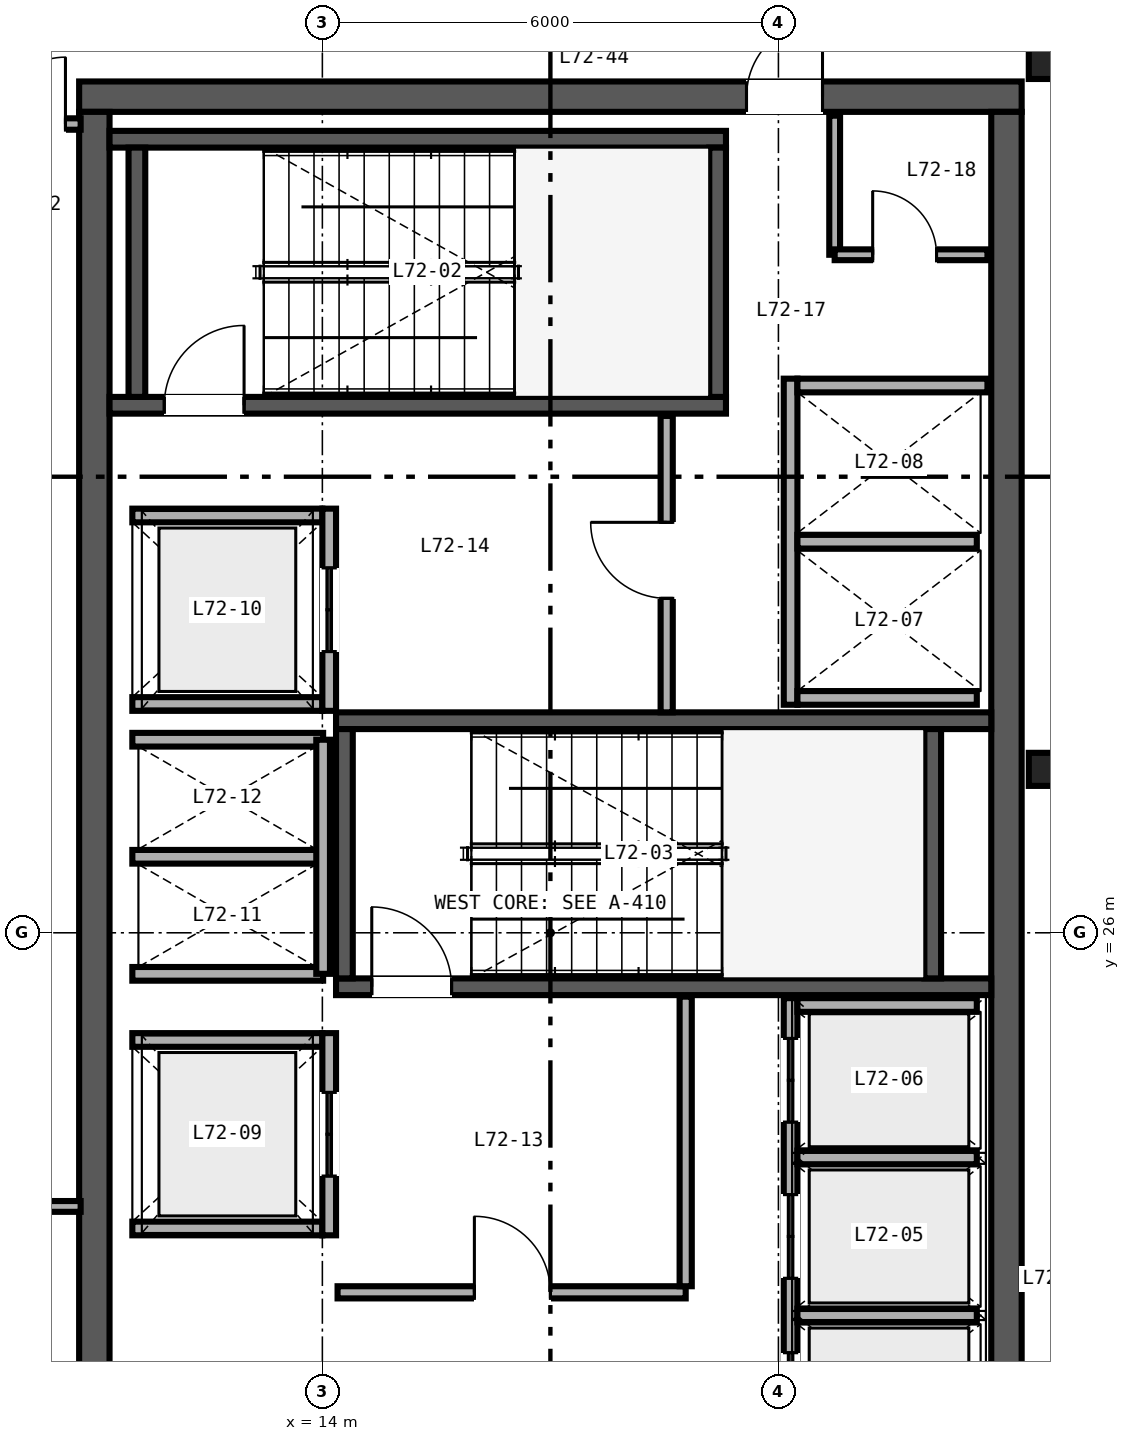
"""IFC4 building model, lengths in metres.
Left out: names, types, materials, properties, quantities, classifications, styles, units other than length and angle.
Written with IfcOpenShell. Run it as: python <this file> out.ifc"""

import sys

from ifc_helpers import new_model, si_unit, direction, frame, frame_2d, origin, origin_2d, place, context, subcontext, project, spatial, rectangle, i_section, extrude, source, transform, mapped, element, fill, save


model = new_model("IFC4")
c1 = context("Model", 3, precision=1e-05, world=origin(), true_north=direction((0.0, 1.0)))
c2 = subcontext(c1, "Body", "Model", "MODEL_VIEW")
j1 = project(units=[si_unit("LENGTHUNIT", "METRE"), si_unit("PLANEANGLEUNIT", "RADIAN")], contexts=[c1])
p1 = place(None, origin())
s1 = spatial("IfcSite", under=j1, at=p1, CompositionType="ELEMENT")
p2 = place(p1, origin())
s2 = spatial("IfcBuilding", under=s1, at=p2, CompositionType="ELEMENT")
p3 = place(p2, frame((0.0, 0.0, 283.2)))
s3 = spatial("IfcBuildingStorey", under=s2, at=p3, CompositionType="ELEMENT", Elevation=283.2)
p4 = place(p3, frame((10.8, 37.0, 0.0), z_axis=(0.0, 0.0, 1.0), x_axis=(1.0, 0.0, 0.0)))
e1 = element("IfcWall", 1, at=p4, inside=s3, PredefinedType="SHEAR", context=c2, shape_type="SweptSolid", body=[
    extrude(rectangle(XDim=12.4, YDim=0.4, at=frame_2d((6.2, 0.0))), origin(), (0.0, 0.0, 1.0), 3.38),
])
p5 = place(p4, frame((8.78, 0.0, 0.0)))
e2 = element("IfcOpeningElement", 2, at=p5, cuts=e1, PredefinedType="OPENING", context=c2, shape_type="SweptSolid", body=[
    extrude(rectangle(XDim=1.0, YDim=2.15, at=frame_2d((0.5, 1.075))), frame((0.0, 0.21, 0.0), z_axis=(0.0, -1.0, 0.0), x_axis=(1.0, 0.0, 0.0)), (0.0, 0.0, 1.0), 0.42),
])
for number, where, z_axis, x_axis in (
    (3, (11.0, 15.2, 0.0), (0.0, 0.0, 1.0), (0.0, 1.0, 0.0)),
    (4, (23.0, 15.2, 0.0), (0.0, 0.0, 1.0), (0.0, 1.0, 0.0)),
):
    element("IfcWall", number, at=place(p3, frame(where, z_axis=z_axis, x_axis=x_axis)), inside=s3, PredefinedType="SHEAR", context=c2, shape_type="SweptSolid", body=[
        extrude(rectangle(XDim=21.6, YDim=0.4, at=frame_2d((10.8, 0.0))), origin(), (0.0, 0.0, 1.0), 3.38),
    ])
p6 = place(p3, frame((11.2, 32.94, 0.0), z_axis=(0.0, 0.0, 1.0), x_axis=(1.0, 0.0, 0.0)))
e5 = element("IfcWall", 5, at=p6, inside=s3, PredefinedType="SHEAR", context=c2, shape_type="SweptSolid", body=[
    extrude(rectangle(XDim=8.11, YDim=0.22, at=frame_2d((4.055, 0.0))), origin(), (0.0, 0.0, 1.0), 3.4),
])
p7 = place(p6, frame((0.72, 0.0, 0.0)))
e6 = element("IfcOpeningElement", 6, at=p7, cuts=e5, PredefinedType="OPENING", context=c2, shape_type="SweptSolid", body=[
    extrude(rectangle(XDim=1.05, YDim=2.15, at=frame_2d((0.525, 1.075))), frame((0.0, 0.12, 0.0), z_axis=(0.0, -1.0, 0.0), x_axis=(1.0, 0.0, 0.0)), (0.0, 0.0, 1.0), 0.24),
])
p8 = place(p3, frame((11.2, 36.44, 0.0), z_axis=(0.0, 0.0, 1.0), x_axis=(1.0, 0.0, 0.0)))
e7 = element("IfcWall", 7, at=p8, inside=s3, PredefinedType="SHEAR", context=c2, shape_type="SweptSolid", body=[
    extrude(rectangle(XDim=8.11, YDim=0.22, at=frame_2d((4.055, 0.0))), origin(), (0.0, 0.0, 1.0), 3.4),
])
for number, where, z_axis, x_axis in (
    (8, (11.56, 33.05, 0.0), (0.0, 0.0, 1.0), (0.0, 1.0, 0.0)),
    (9, (19.2, 33.05, 0.0), (0.0, 0.0, 1.0), (0.0, 1.0, 0.0)),
):
    element("IfcWall", number, at=place(p3, frame(where, z_axis=z_axis, x_axis=x_axis)), inside=s3, PredefinedType="SHEAR", context=c2, shape_type="SweptSolid", body=[
        extrude(rectangle(XDim=3.28, YDim=0.22, at=frame_2d((1.64, 0.0))), origin(), (0.0, 0.0, 1.0), 3.4),
    ])
p9 = place(p3, frame((14.18, 25.29, 0.0), z_axis=(0.0, 0.0, 1.0), x_axis=(1.0, 0.0, 0.0)))
e10 = element("IfcWall", 10, at=p9, inside=s3, PredefinedType="SHEAR", context=c2, shape_type="SweptSolid", body=[
    extrude(rectangle(XDim=8.62, YDim=0.22, at=frame_2d((4.31, 0.0))), origin(), (0.0, 0.0, 1.0), 3.4),
])
p10 = place(p9, frame((0.47, 0.0, 0.0)))
e11 = element("IfcOpeningElement", 11, at=p10, cuts=e10, PredefinedType="OPENING", context=c2, shape_type="SweptSolid", body=[
    extrude(rectangle(XDim=1.05, YDim=2.15, at=frame_2d((0.525, 1.075))), frame((0.0, 0.12, 0.0), z_axis=(0.0, -1.0, 0.0), x_axis=(1.0, 0.0, 0.0)), (0.0, 0.0, 1.0), 0.24),
])
p11 = place(p3, frame((14.18, 28.79, 0.0), z_axis=(0.0, 0.0, 1.0), x_axis=(1.0, 0.0, 0.0)))
e12 = element("IfcWall", 12, at=p11, inside=s3, PredefinedType="SHEAR", context=c2, shape_type="SweptSolid", body=[
    extrude(rectangle(XDim=8.62, YDim=0.22, at=frame_2d((4.31, 0.0))), origin(), (0.0, 0.0, 1.0), 3.4),
])
for number, where, z_axis, x_axis in (
    (13, (14.29, 25.4, 0.0), (0.0, 0.0, 1.0), (0.0, 1.0, 0.0)),
    (14, (22.03, 25.4, 0.0), (0.0, 0.0, 1.0), (0.0, 1.0, 0.0)),
):
    element("IfcWall", number, at=place(p3, frame(where, z_axis=z_axis, x_axis=x_axis)), inside=s3, PredefinedType="SHEAR", context=c2, shape_type="SweptSolid", body=[
        extrude(rectangle(XDim=3.28, YDim=0.22, at=frame_2d((1.64, 0.0))), origin(), (0.0, 0.0, 1.0), 3.4),
    ])
m1 = source(origin(), c2, "Body", "SweptSolid", [
    extrude(i_section(OverallWidth=0.412, OverallDepth=0.435, WebThickness=0.036, FlangeThickness=0.057, FilletRadius=0.025, at=origin_2d()), origin(), (0.0, 0.0, 1.0), 3.38),
])
for number, where, z_axis, x_axis in (
    (15, (23.5, 28.15, 0.0), (0.0, 0.0, 1.0), (1.0, 0.0, 0.0)),
    (16, (23.5, 37.45, 0.0), (0.0, 0.0, 1.0), (1.0, 0.0, 0.0)),
):
    element("IfcColumn", number, at=place(p3, frame(where, z_axis=z_axis, x_axis=x_axis)), inside=s3, PredefinedType="COLUMN", context=c2, shape_type="MappedRepresentation", body=[
        mapped(m1, transform((0.0, 0.0, 0.0), scale=1.0)),
    ])
p12 = place(p3, frame((20.16, 18.82, 0.0), z_axis=(0.0, 0.0, 1.0), x_axis=(0.0, 1.0, 0.0)))
e17 = element("IfcWall", 17, at=p12, inside=s3, PredefinedType="SOLIDWALL", context=c2, shape_type="SweptSolid", body=[
    extrude(rectangle(XDim=6.32, YDim=0.18, at=frame_2d((3.16, 0.0))), origin(), (0.0, 0.0, 1.0), 2.48),
])
p13 = place(p12, frame((0.555, 0.0, 0.0)))
e18 = element("IfcOpeningElement", 18, at=p13, cuts=e17, PredefinedType="OPENING", context=c2, shape_type="SweptSolid", body=[
    extrude(rectangle(XDim=1.1, YDim=2.2, at=frame_2d((0.55, 1.1))), frame((0.0, 0.1, 0.0), z_axis=(0.0, -1.0, 0.0), x_axis=(1.0, 0.0, 0.0)), (0.0, 0.0, 1.0), 0.2),
])
p14 = place(p12, frame((2.635, 0.0, 0.0)))
e19 = element("IfcOpeningElement", 19, at=p14, cuts=e17, PredefinedType="OPENING", context=c2, shape_type="SweptSolid", body=[
    extrude(rectangle(XDim=1.1, YDim=2.2, at=frame_2d((0.55, 1.1))), frame((0.0, 0.1, 0.0), z_axis=(0.0, -1.0, 0.0), x_axis=(1.0, 0.0, 0.0)), (0.0, 0.0, 1.0), 0.2),
])
p15 = place(p12, frame((4.69, 0.0, 0.0)))
e20 = element("IfcOpeningElement", 20, at=p15, cuts=e17, PredefinedType="OPENING", context=c2, shape_type="SweptSolid", body=[
    extrude(rectangle(XDim=1.1, YDim=2.2, at=frame_2d((0.55, 1.1))), frame((0.0, 0.1, 0.0), z_axis=(0.0, -1.0, 0.0), x_axis=(1.0, 0.0, 0.0)), (0.0, 0.0, 1.0), 0.2),
])
p16 = place(p3, frame((20.25, 25.05, 0.0), z_axis=(0.0, 0.0, 1.0), x_axis=(1.0, 0.0, 0.0)))
e21 = element("IfcWall", 21, at=p16, inside=s3, PredefinedType="SOLIDWALL", context=c2, shape_type="SweptSolid", body=[
    extrude(rectangle(XDim=2.36, YDim=0.18, at=frame_2d((1.18, 0.0))), origin(), (0.0, 0.0, 1.0), 3.38),
])
p17 = place(p3, frame((20.25, 20.965, 0.0), z_axis=(0.0, 0.0, 1.0), x_axis=(1.0, 0.0, 0.0)))
e22 = element("IfcWall", 22, at=p17, inside=s3, PredefinedType="SOLIDWALL", context=c2, shape_type="SweptSolid", body=[
    extrude(rectangle(XDim=2.36, YDim=0.18, at=frame_2d((1.18, 0.0))), origin(), (0.0, 0.0, 1.0), 2.48),
])
p18 = place(p3, frame((20.25, 23.045, 0.0), z_axis=(0.0, 0.0, 1.0), x_axis=(1.0, 0.0, 0.0)))
e23 = element("IfcWall", 23, at=p18, inside=s3, PredefinedType="SOLIDWALL", context=c2, shape_type="SweptSolid", body=[
    extrude(rectangle(XDim=2.36, YDim=0.18, at=frame_2d((1.18, 0.0))), origin(), (0.0, 0.0, 1.0), 3.38),
])
p19 = place(p3, frame((20.16, 29.0, 0.0), z_axis=(0.0, 0.0, 1.0), x_axis=(0.0, 1.0, 0.0)))
e24 = element("IfcWall", 24, at=p19, inside=s3, PredefinedType="SOLIDWALL", context=c2, shape_type="SweptSolid", body=[
    extrude(rectangle(XDim=4.29, YDim=0.18, at=frame_2d((2.145, 0.0))), origin(), (0.0, 0.0, 1.0), 3.38),
])
p20 = place(p3, frame((20.25, 29.09, 0.0), z_axis=(0.0, 0.0, 1.0), x_axis=(1.0, 0.0, 0.0)))
e25 = element("IfcWall", 25, at=p20, inside=s3, PredefinedType="SOLIDWALL", context=c2, shape_type="SweptSolid", body=[
    extrude(rectangle(XDim=2.36, YDim=0.18, at=frame_2d((1.18, 0.0))), origin(), (0.0, 0.0, 1.0), 3.38),
])
p21 = place(p3, frame((20.25, 33.2, 0.0), z_axis=(0.0, 0.0, 1.0), x_axis=(1.0, 0.0, 0.0)))
e26 = element("IfcWall", 26, at=p21, inside=s3, PredefinedType="SOLIDWALL", context=c2, shape_type="SweptSolid", body=[
    extrude(rectangle(XDim=2.5, YDim=0.18, at=frame_2d((1.25, 0.0))), origin(), (0.0, 0.0, 1.0), 3.38),
])
p22 = place(p3, frame((20.25, 31.145, 0.0), z_axis=(0.0, 0.0, 1.0), x_axis=(1.0, 0.0, 0.0)))
e27 = element("IfcWall", 27, at=p22, inside=s3, PredefinedType="SOLIDWALL", context=c2, shape_type="SweptSolid", body=[
    extrude(rectangle(XDim=2.36, YDim=0.18, at=frame_2d((1.18, 0.0))), origin(), (0.0, 0.0, 1.0), 3.38),
])
for number, where, z_axis, x_axis in (
    (28, (11.5, 22.11, 0.0), (0.0, 0.0, 1.0), (1.0, 0.0, 0.0)),
    (29, (11.5, 24.59, 0.0), (0.0, 0.0, 1.0), (1.0, 0.0, 0.0)),
):
    element("IfcWall", number, at=place(p3, frame(where, z_axis=z_axis, x_axis=x_axis)), inside=s3, PredefinedType="SOLIDWALL", context=c2, shape_type="SweptSolid", body=[
        extrude(rectangle(XDim=2.5, YDim=0.18, at=frame_2d((1.25, 0.0))), origin(), (0.0, 0.0, 1.0), 3.38),
    ])
p23 = place(p3, frame((14.09, 22.02, 0.0), z_axis=(0.0, 0.0, 1.0), x_axis=(0.0, 1.0, 0.0)))
e30 = element("IfcWall", 30, at=p23, inside=s3, PredefinedType="SOLIDWALL", context=c2, shape_type="SweptSolid", body=[
    extrude(rectangle(XDim=2.66, YDim=0.18, at=frame_2d((1.33, 0.0))), origin(), (0.0, 0.0, 1.0), 3.38),
])
p24 = place(p23, frame((0.78, 0.0, 0.0)))
e31 = element("IfcOpeningElement", 31, at=p24, cuts=e30, PredefinedType="OPENING", context=c2, shape_type="SweptSolid", body=[
    extrude(rectangle(XDim=1.1, YDim=2.2, at=frame_2d((0.55, 1.1))), frame((0.0, 0.1, 0.0), z_axis=(0.0, -1.0, 0.0), x_axis=(1.0, 0.0, 0.0)), (0.0, 0.0, 1.0), 0.2),
])
for number, where, z_axis, x_axis in (
    (32, (11.5, 29.01, 0.0), (0.0, 0.0, 1.0), (1.0, 0.0, 0.0)),
    (33, (11.5, 31.49, 0.0), (0.0, 0.0, 1.0), (1.0, 0.0, 0.0)),
):
    element("IfcWall", number, at=place(p3, frame(where, z_axis=z_axis, x_axis=x_axis)), inside=s3, PredefinedType="SOLIDWALL", context=c2, shape_type="SweptSolid", body=[
        extrude(rectangle(XDim=2.5, YDim=0.18, at=frame_2d((1.25, 0.0))), origin(), (0.0, 0.0, 1.0), 3.38),
    ])
p25 = place(p3, frame((14.09, 28.92, 0.0), z_axis=(0.0, 0.0, 1.0), x_axis=(0.0, 1.0, 0.0)))
e34 = element("IfcWall", 34, at=p25, inside=s3, PredefinedType="SOLIDWALL", context=c2, shape_type="SweptSolid", body=[
    extrude(rectangle(XDim=2.66, YDim=0.18, at=frame_2d((1.33, 0.0))), origin(), (0.0, 0.0, 1.0), 3.38),
])
p26 = place(p25, frame((0.78, 0.0, 0.0)))
e35 = element("IfcOpeningElement", 35, at=p26, cuts=e34, PredefinedType="OPENING", context=c2, shape_type="SweptSolid", body=[
    extrude(rectangle(XDim=1.1, YDim=2.2, at=frame_2d((0.55, 1.1))), frame((0.0, 0.1, 0.0), z_axis=(0.0, -1.0, 0.0), x_axis=(1.0, 0.0, 0.0)), (0.0, 0.0, 1.0), 0.2),
])
for number, where, z_axis, x_axis in (
    (36, (11.5, 25.46, 0.0), (0.0, 0.0, 1.0), (1.0, 0.0, 0.0)),
    (37, (11.5, 27.0, 0.0), (0.0, 0.0, 1.0), (1.0, 0.0, 0.0)),
    (38, (11.5, 28.54, 0.0), (0.0, 0.0, 1.0), (1.0, 0.0, 0.0)),
):
    element("IfcWall", number, at=place(p3, frame(where, z_axis=z_axis, x_axis=x_axis)), inside=s3, PredefinedType="SOLIDWALL", context=c2, shape_type="SweptSolid", body=[
        extrude(rectangle(XDim=2.51, YDim=0.18, at=frame_2d((1.255, 0.0))), origin(), (0.0, 0.0, 1.0), 3.38),
    ])
p27 = place(p3, frame((14.01, 25.46, 0.0), z_axis=(0.0, 0.0, 1.0), x_axis=(0.0, 1.0, 0.0)))
e39 = element("IfcWall", 39, at=p27, inside=s3, PredefinedType="SOLIDWALL", context=c2, shape_type="SweptSolid", body=[
    extrude(rectangle(XDim=3.08, YDim=0.18, at=frame_2d((1.54, 0.0))), origin(), (0.0, 0.0, 1.0), 3.38),
])
p28 = place(p3, frame((14.2, 21.27, 0.0), z_axis=(0.0, 0.0, 1.0), x_axis=(1.0, 0.0, 0.0)))
e40 = element("IfcWall", 40, at=p28, inside=s3, PredefinedType="PARTITIONING", context=c2, shape_type="SweptSolid", body=[
    extrude(rectangle(XDim=4.58, YDim=0.16, at=frame_2d((2.29, 0.0))), origin(), (0.0, 0.0, 1.0), 3.38),
])
p29 = place(p28, frame((1.8, 0.0, 0.0)))
e41 = element("IfcOpeningElement", 41, at=p29, cuts=e40, PredefinedType="OPENING", context=c2, shape_type="SweptSolid", body=[
    extrude(rectangle(XDim=1.0, YDim=2.15, at=frame_2d((0.5, 1.075))), frame((0.0, 0.09, 0.0), z_axis=(0.0, -1.0, 0.0), x_axis=(1.0, 0.0, 0.0)), (0.0, 0.0, 1.0), 0.18),
])
p30 = place(p3, frame((18.78, 21.35, 0.0), z_axis=(0.0, 0.0, 1.0), x_axis=(0.0, 1.0, 0.0)))
e42 = element("IfcWall", 42, at=p30, inside=s3, PredefinedType="PARTITIONING", context=c2, shape_type="SweptSolid", body=[
    extrude(rectangle(XDim=3.81, YDim=0.16, at=frame_2d((1.905, 0.0))), origin(), (0.0, 0.0, 1.0), 3.38),
])
p31 = place(p3, frame((18.53, 28.9, 0.0), z_axis=(0.0, 0.0, 1.0), x_axis=(0.0, 1.0, 0.0)))
e43 = element("IfcWall", 43, at=p31, inside=s3, PredefinedType="PARTITIONING", context=c2, shape_type="SweptSolid", body=[
    extrude(rectangle(XDim=3.9, YDim=0.16, at=frame_2d((1.95, 0.0))), origin(), (0.0, 0.0, 1.0), 3.38),
])
p32 = place(p31, frame((1.5, 0.0, 0.0)))
e44 = element("IfcOpeningElement", 44, at=p32, cuts=e43, PredefinedType="OPENING", context=c2, shape_type="SweptSolid", body=[
    extrude(rectangle(XDim=1.0, YDim=2.15, at=frame_2d((0.5, 1.075))), frame((0.0, 0.09, 0.0), z_axis=(0.0, -1.0, 0.0), x_axis=(1.0, 0.0, 0.0)), (0.0, 0.0, 1.0), 0.18),
])
p33 = place(p3, frame((20.74, 34.92, 0.0), z_axis=(0.0, 0.0, 1.0), x_axis=(0.0, 1.0, 0.0)))
e45 = element("IfcWall", 45, at=p33, inside=s3, PredefinedType="PARTITIONING", context=c2, shape_type="SweptSolid", body=[
    extrude(rectangle(XDim=1.83, YDim=0.142, at=frame_2d((0.915, 0.0))), origin(), (0.0, 0.0, 1.0), 3.38),
])
p34 = place(p3, frame((20.74, 34.92, 0.0), z_axis=(0.0, 0.0, 1.0), x_axis=(1.0, 0.0, 0.0)))
e46 = element("IfcWall", 46, at=p34, inside=s3, PredefinedType="PARTITIONING", context=c2, shape_type="SweptSolid", body=[
    extrude(rectangle(XDim=2.01, YDim=0.142, at=frame_2d((1.005, 0.0))), origin(), (0.0, 0.0, 1.0), 3.38),
])
p35 = place(p34, frame((0.5, 0.0, 0.0)))
e47 = element("IfcOpeningElement", 47, at=p35, cuts=e46, PredefinedType="OPENING", context=c2, shape_type="SweptSolid", body=[
    extrude(rectangle(XDim=0.84, YDim=2.1, at=frame_2d((0.42, 1.05))), frame((0.0, 0.081, 0.0), z_axis=(0.0, -1.0, 0.0), x_axis=(1.0, 0.0, 0.0)), (0.0, 0.0, 1.0), 0.162),
])
p36 = place(p3, frame((8.16, 36.64, 0.0), z_axis=(0.0, 0.0, 1.0), x_axis=(1.0, 0.0, 0.0)))
e48 = element("IfcWall", 48, at=p36, inside=s3, PredefinedType="PARTITIONING", context=c2, shape_type="SweptSolid", body=[
    extrude(rectangle(XDim=2.66, YDim=0.15, at=frame_2d((1.33, 0.0))), origin(), (0.0, 0.0, 1.0), 2.763),
])
p37 = place(p36, frame((1.58, 0.0, 0.0)))
e49 = element("IfcOpeningElement", 49, at=p37, cuts=e48, PredefinedType="OPENING", context=c2, shape_type="SweptSolid", body=[
    extrude(rectangle(XDim=0.88, YDim=2.15, at=frame_2d((0.44, 1.075))), frame((0.0, 0.085, 0.0), z_axis=(0.0, -1.0, 0.0), x_axis=(1.0, 0.0, 0.0)), (0.0, 0.0, 1.0), 0.17),
])
p38 = place(p3, frame((8.16, 22.4, 0.0), z_axis=(0.0, 0.0, 1.0), x_axis=(1.0, 0.0, 0.0)))
e50 = element("IfcWall", 50, at=p38, inside=s3, PredefinedType="PARTITIONING", context=c2, shape_type="SweptSolid", body=[
    extrude(rectangle(XDim=2.66, YDim=0.142, at=frame_2d((1.33, 0.0))), origin(), (0.0, 0.0, 1.0), 2.601),
])
m2 = source(origin(), c2, "Body", "SweptSolid", [
    extrude(rectangle(XDim=1.05, YDim=2.15, at=frame_2d((0.525, 1.075))), frame((0.0, 0.025, 0.0), z_axis=(0.0, -1.0, 0.0), x_axis=(1.0, 0.0, 0.0)), (0.0, 0.0, 1.0), 0.05),
])
p39 = place(p7, origin())
e51 = element("IfcDoor", 51, at=p39, inside=s3, OperationType="SINGLE_SWING_RIGHT", PredefinedType="DOOR", context=c2, shape_type="MappedRepresentation", body=[
    mapped(m2, transform((0.0, 0.0, 0.0), scale=1.0)),
])
fill(e6, e51)
p40 = place(p10, origin())
e52 = element("IfcDoor", 52, at=p40, inside=s3, OperationType="SINGLE_SWING_LEFT", PredefinedType="DOOR", context=c2, shape_type="MappedRepresentation", body=[
    mapped(m2, transform((0.0, 0.0, 0.0), scale=1.0)),
])
fill(e11, e52)
m3 = source(origin(), c2, "Body", "SweptSolid", [
    extrude(rectangle(XDim=1.1, YDim=2.2, at=frame_2d((0.55, 1.1))), frame((0.0, 0.025, 0.0), z_axis=(0.0, -1.0, 0.0), x_axis=(1.0, 0.0, 0.0)), (0.0, 0.0, 1.0), 0.05),
])
p41 = place(p13, origin())
e53 = element("IfcDoor", 53, at=p41, inside=s3, OperationType="DOUBLE_DOOR_SLIDING", PredefinedType="DOOR", context=c2, shape_type="MappedRepresentation", body=[
    mapped(m3, transform((0.0, 0.0, 0.0), scale=1.0)),
])
fill(e18, e53)
p42 = place(p14, origin())
e54 = element("IfcDoor", 54, at=p42, inside=s3, OperationType="DOUBLE_DOOR_SLIDING", PredefinedType="DOOR", context=c2, shape_type="MappedRepresentation", body=[
    mapped(m3, transform((0.0, 0.0, 0.0), scale=1.0)),
])
fill(e19, e54)
p43 = place(p15, origin())
e55 = element("IfcDoor", 55, at=p43, inside=s3, OperationType="DOUBLE_DOOR_SLIDING", PredefinedType="DOOR", context=c2, shape_type="MappedRepresentation", body=[
    mapped(m3, transform((0.0, 0.0, 0.0), scale=1.0)),
])
fill(e20, e55)
p44 = place(p24, origin())
e56 = element("IfcDoor", 56, at=p44, inside=s3, OperationType="DOUBLE_DOOR_SLIDING", PredefinedType="DOOR", context=c2, shape_type="MappedRepresentation", body=[
    mapped(m3, transform((0.0, 0.0, 0.0), scale=1.0)),
])
fill(e31, e56)
p45 = place(p26, origin())
e57 = element("IfcDoor", 57, at=p45, inside=s3, OperationType="DOUBLE_DOOR_SLIDING", PredefinedType="DOOR", context=c2, shape_type="MappedRepresentation", body=[
    mapped(m3, transform((0.0, 0.0, 0.0), scale=1.0)),
])
fill(e35, e57)
m4 = source(origin(), c2, "Body", "SweptSolid", [
    extrude(rectangle(XDim=1.0, YDim=2.15, at=frame_2d((0.5, 1.075))), frame((0.0, 0.025, 0.0), z_axis=(0.0, -1.0, 0.0), x_axis=(1.0, 0.0, 0.0)), (0.0, 0.0, 1.0), 0.05),
])
p46 = place(p29, origin())
e58 = element("IfcDoor", 58, at=p46, inside=s3, OperationType="SINGLE_SWING_LEFT", PredefinedType="DOOR", context=c2, shape_type="MappedRepresentation", body=[
    mapped(m4, transform((0.0, 0.0, 0.0), scale=1.0)),
])
fill(e41, e58)
p47 = place(p32, origin())
e59 = element("IfcDoor", 59, at=p47, inside=s3, OperationType="SINGLE_SWING_RIGHT", PredefinedType="DOOR", context=c2, shape_type="MappedRepresentation", body=[
    mapped(m4, transform((0.0, 0.0, 0.0), scale=1.0)),
])
fill(e44, e59)
m5 = source(origin(), c2, "Body", "SweptSolid", [
    extrude(rectangle(XDim=0.84, YDim=2.1, at=frame_2d((0.42, 1.05))), frame((0.0, 0.025, 0.0), z_axis=(0.0, -1.0, 0.0), x_axis=(1.0, 0.0, 0.0)), (0.0, 0.0, 1.0), 0.05),
])
p48 = place(p35, origin())
e60 = element("IfcDoor", 60, at=p48, inside=s3, OperationType="SINGLE_SWING_LEFT", PredefinedType="DOOR", context=c2, shape_type="MappedRepresentation", body=[
    mapped(m5, transform((0.0, 0.0, 0.0), scale=1.0)),
])
fill(e47, e60)
p49 = place(p5, origin())
e61 = element("IfcDoor", 61, at=p49, inside=s3, OperationType="SINGLE_SWING_RIGHT", PredefinedType="DOOR", context=c2, shape_type="MappedRepresentation", body=[
    mapped(m4, transform((0.0, 0.0, 0.0), scale=1.0)),
])
fill(e2, e61)
m6 = source(origin(), c2, "Body", "SweptSolid", [
    extrude(rectangle(XDim=0.88, YDim=2.15, at=frame_2d((0.44, 1.075))), frame((0.0, 0.025, 0.0), z_axis=(0.0, -1.0, 0.0), x_axis=(1.0, 0.0, 0.0)), (0.0, 0.0, 1.0), 0.05),
])
p50 = place(p37, origin())
e62 = element("IfcDoor", 62, at=p50, inside=s3, OperationType="SINGLE_SWING_RIGHT", PredefinedType="DOOR", context=c2, shape_type="MappedRepresentation", body=[
    mapped(m6, transform((0.0, 0.0, 0.0), scale=1.0)),
])
fill(e49, e62)
save(model, sys.argv[1])
